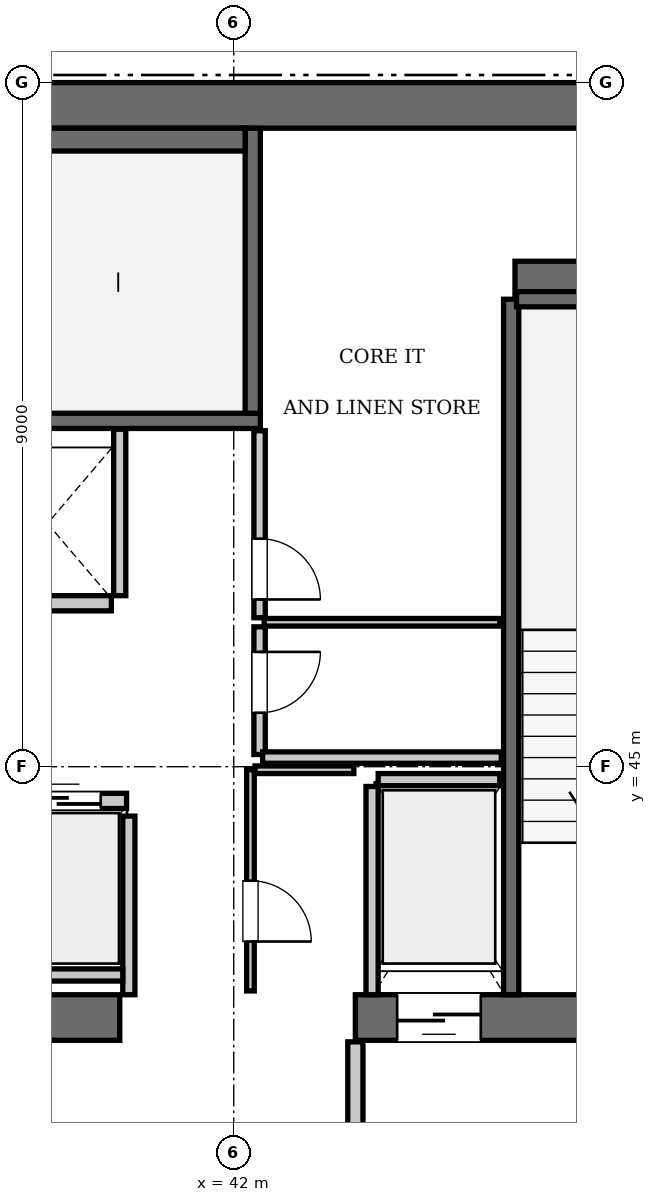
"""IFC4 building model, lengths in metres.
Left out: names, types, materials, properties, quantities, classifications, styles, units other than length and angle.
Written with IfcOpenShell. Run it as: python <this file> out.ifc"""

import sys

from ifc_helpers import new_model, si_unit, direction, frame, frame_2d, origin, place, context, subcontext, project, spatial, rectangle, extrude, element, fill, save


model = new_model("IFC4")
c1 = context("Model", 3, precision=1e-05, world=origin(), true_north=direction((0.0, 1.0)))
c2 = subcontext(c1, "Body", "Model", "MODEL_VIEW")
j1 = project(units=[si_unit("LENGTHUNIT", "METRE"), si_unit("PLANEANGLEUNIT", "RADIAN")], contexts=[c1])
p1 = place(None, origin())
s1 = spatial("IfcSite", under=j1, at=p1, CompositionType="ELEMENT")
p2 = place(p1, origin())
s2 = spatial("IfcBuilding", under=s1, at=p2, CompositionType="ELEMENT")
p3 = place(p2, frame((0.0, 0.0, 297.15)))
s3 = spatial("IfcBuildingStorey", under=s2, at=p3, CompositionType="ELEMENT", Elevation=297.15)
p4 = place(p3, frame((25.2, 53.7, 0.0), z_axis=(0.0, 0.0, 1.0), x_axis=(1.0, 0.0, 0.0)))
e1 = element("IfcWall", 1, at=p4, inside=s3, PredefinedType="SHEAR", context=c2, shape_type="SweptSolid", body=[
    extrude(rectangle(XDim=25.2, YDim=0.6, at=frame_2d((12.6, 0.0))), origin(), (0.0, 0.0, 1.0), 3.85),
])
p5 = place(p3, frame((35.1, 41.7, 0.0), z_axis=(0.0, 0.0, 1.0), x_axis=(1.0, 0.0, 0.0)))
e2 = element("IfcWall", 2, at=p5, inside=s3, PredefinedType="SHEAR", context=c2, shape_type="SweptSolid", body=[
    extrude(rectangle(XDim=5.4, YDim=0.6, at=frame_2d((2.7, 0.0))), origin(), (0.0, 0.0, 1.0), 3.85),
])
p6 = place(p3, frame((43.6, 41.7, 0.0), z_axis=(0.0, 0.0, 1.0), x_axis=(1.0, 0.0, 0.0)))
e3 = element("IfcWall", 3, at=p6, inside=s3, PredefinedType="SHEAR", context=c2, shape_type="SweptSolid", body=[
    extrude(rectangle(XDim=6.8, YDim=0.6, at=frame_2d((3.4, 0.0))), origin(), (0.0, 0.0, 1.0), 3.85),
])
p7 = place(p6, frame((3.9, 0.0, 0.0)))
e4 = element("IfcOpeningElement", 4, at=p7, cuts=e3, PredefinedType="OPENING", context=c2, shape_type="SweptSolid", body=[
    extrude(rectangle(XDim=1.15, YDim=2.15, at=frame_2d((0.575, 1.075))), frame((0.0, 0.31, 0.0), z_axis=(0.0, -1.0, 0.0), x_axis=(1.0, 0.0, 0.0)), (0.0, 0.0, 1.0), 0.62),
])
p8 = place(p6, frame((0.55, 0.0, 0.0)))
e5 = element("IfcOpeningElement", 5, at=p8, cuts=e3, PredefinedType="OPENING", context=c2, shape_type="SweptSolid", body=[
    extrude(rectangle(XDim=1.1, YDim=2.2, at=frame_2d((0.55, 1.1))), frame((0.0, 0.31, 0.0), z_axis=(0.0, -1.0, 0.0), x_axis=(1.0, 0.0, 0.0)), (0.0, 0.0, 1.0), 0.62),
])
p9 = place(p3, frame((45.7, 51.4, 0.0), z_axis=(0.0, 0.0, 1.0), x_axis=(1.0, 0.0, 0.0)))
e6 = element("IfcWall", 6, at=p9, inside=s3, PredefinedType="SHEAR", context=c2, shape_type="SweptSolid", body=[
    extrude(rectangle(XDim=4.1, YDim=0.5, at=frame_2d((2.05, 0.0))), origin(), (0.0, 0.0, 1.0), 3.85),
])
p10 = place(p3, frame((33.25, 49.55, 0.0), z_axis=(0.0, 0.0, 1.0), x_axis=(1.0, 0.0, 0.0)))
e7 = element("IfcWall", 7, at=p10, inside=s3, PredefinedType="SOLIDWALL", context=c2, shape_type="SweptSolid", body=[
    extrude(rectangle(XDim=9.1, YDim=0.2, at=frame_2d((4.55, 0.0))), origin(), (0.0, 0.0, 1.0), 3.61),
])
p11 = place(p3, frame((42.25, 49.65, 0.0), z_axis=(0.0, 0.0, 1.0), x_axis=(0.0, 1.0, 0.0)))
e8 = element("IfcWall", 8, at=p11, inside=s3, PredefinedType="SOLIDWALL", context=c2, shape_type="SweptSolid", body=[
    extrude(rectangle(XDim=3.75, YDim=0.2, at=frame_2d((1.875, 0.0))), origin(), (0.0, 0.0, 1.0), 3.61),
])
p12 = place(p3, frame((33.45, 53.25, 0.0), z_axis=(0.0, 0.0, 1.0), x_axis=(1.0, 0.0, 0.0)))
e9 = element("IfcWall", 9, at=p12, inside=s3, PredefinedType="SOLIDWALL", context=c2, shape_type="SweptSolid", body=[
    extrude(rectangle(XDim=8.7, YDim=0.3, at=frame_2d((4.35, 0.0))), origin(), (0.0, 0.0, 1.0), 3.61),
])
p13 = place(p3, frame((45.65, 42.0, 0.0), z_axis=(0.0, 0.0, 1.0), x_axis=(0.0, 1.0, 0.0)))
e10 = element("IfcWall", 10, at=p13, inside=s3, PredefinedType="SOLIDWALL", context=c2, shape_type="SweptSolid", body=[
    extrude(rectangle(XDim=9.15, YDim=0.2, at=frame_2d((4.575, 0.0))), origin(), (0.0, 0.0, 1.0), 3.61),
])
p14 = place(p3, frame((45.72, 51.15, 0.0), z_axis=(0.0, 0.0, 1.0), x_axis=(1.0, 0.0, 0.0)))
e11 = element("IfcWall", 11, at=p14, inside=s3, PredefinedType="SOLIDWALL", context=c2, shape_type="SweptSolid", body=[
    extrude(rectangle(XDim=3.5, YDim=0.2, at=frame_2d((1.75, 0.0))), origin(), (0.0, 0.0, 1.0), 3.61),
])
p15 = place(p3, frame((38.91, 44.55, 0.0), z_axis=(0.0, 0.0, 1.0), x_axis=(1.0, 0.0, 0.0)))
e12 = element("IfcWall", 12, at=p15, inside=s3, PredefinedType="SOLIDWALL", context=c2, shape_type="SweptSolid", body=[
    extrude(rectangle(XDim=1.68, YDim=0.2, at=frame_2d((0.84, 0.0))), origin(), (0.0, 0.0, 1.0), 3.61),
])
p16 = place(p15, frame((0.34, 0.0, 0.0)))
e13 = element("IfcOpeningElement", 13, at=p16, cuts=e12, PredefinedType="OPENING", context=c2, shape_type="SweptSolid", body=[
    extrude(rectangle(XDim=1.0, YDim=2.15, at=frame_2d((0.5, 1.075))), frame((0.0, 0.11, 0.0), z_axis=(0.0, -1.0, 0.0), x_axis=(1.0, 0.0, 0.0)), (0.0, 0.0, 1.0), 0.22),
])
p17 = place(p3, frame((38.71, 47.15, 0.0), z_axis=(0.0, 0.0, 1.0), x_axis=(1.0, 0.0, 0.0)))
e14 = element("IfcWall", 14, at=p17, inside=s3, PredefinedType="SOLIDWALL", context=c2, shape_type="SweptSolid", body=[
    extrude(rectangle(XDim=1.68, YDim=0.2, at=frame_2d((0.84, 0.0))), origin(), (0.0, 0.0, 1.0), 3.61),
])
p18 = place(p3, frame((43.9, 44.83, 0.0), z_axis=(0.0, 0.0, 1.0), x_axis=(1.0, 0.0, 0.0)))
e15 = element("IfcWall", 15, at=p18, inside=s3, PredefinedType="SOLIDWALL", context=c2, shape_type="SweptSolid", body=[
    extrude(rectangle(XDim=1.6, YDim=0.16, at=frame_2d((0.8, 0.0))), origin(), (0.0, 0.0, 1.0), 3.61),
])
p19 = place(p3, frame((43.82, 42.0, 0.0), z_axis=(0.0, 0.0, 1.0), x_axis=(0.0, 1.0, 0.0)))
e16 = element("IfcWall", 16, at=p19, inside=s3, PredefinedType="SOLIDWALL", context=c2, shape_type="SweptSolid", body=[
    extrude(rectangle(XDim=2.74, YDim=0.16, at=frame_2d((1.37, 0.0))), origin(), (0.0, 0.0, 1.0), 3.61),
])
p20 = place(p3, frame((40.62, 42.0, 0.0), z_axis=(0.0, 0.0, 1.0), x_axis=(0.0, 1.0, 0.0)))
e17 = element("IfcWall", 17, at=p20, inside=s3, PredefinedType="SOLIDWALL", context=c2, shape_type="SweptSolid", body=[
    extrude(rectangle(XDim=2.35, YDim=0.16, at=frame_2d((1.175, 0.0))), origin(), (0.0, 0.0, 1.0), 3.61),
])
p21 = place(p3, frame((35.52, 42.26, 0.0), z_axis=(0.0, 0.0, 1.0), x_axis=(1.0, 0.0, 0.0)))
e18 = element("IfcWall", 18, at=p21, inside=s3, PredefinedType="SOLIDWALL", context=c2, shape_type="SweptSolid", body=[
    extrude(rectangle(XDim=5.02, YDim=0.16, at=frame_2d((2.51, 0.0))), origin(), (0.0, 0.0, 1.0), 3.61),
])
p22 = place(p3, frame((40.5, 47.25, 0.0), z_axis=(0.0, 0.0, 1.0), x_axis=(0.0, 1.0, 0.0)))
e19 = element("IfcWall", 19, at=p22, inside=s3, PredefinedType="SOLIDWALL", context=c2, shape_type="SweptSolid", body=[
    extrude(rectangle(XDim=2.19, YDim=0.16, at=frame_2d((1.095, 0.0))), origin(), (0.0, 0.0, 1.0), 3.61),
])
p23 = place(p3, frame((43.6, 38.31, 0.0), z_axis=(0.0, 0.0, 1.0), x_axis=(0.0, 1.0, 0.0)))
e20 = element("IfcWall", 20, at=p23, inside=s3, PredefinedType="PARTITIONING", context=c2, shape_type="SweptSolid", body=[
    extrude(rectangle(XDim=3.07, YDim=0.2, at=frame_2d((1.535, 0.0))), origin(), (0.0, 0.0, 1.0), 3.61),
])
p24 = place(p3, frame((42.22, 42.05, 0.0), z_axis=(0.0, 0.0, 1.0), x_axis=(0.0, 1.0, 0.0)))
e21 = element("IfcWall", 21, at=p24, inside=s3, PredefinedType="PARTITIONING", context=c2, shape_type="SweptSolid", body=[
    extrude(rectangle(XDim=2.91, YDim=0.1, at=frame_2d((1.455, 0.0))), origin(), (0.0, 0.0, 1.0), 3.61),
])
p25 = place(p24, frame((0.65, 0.0, 0.0)))
e22 = element("IfcOpeningElement", 22, at=p25, cuts=e21, PredefinedType="OPENING", context=c2, shape_type="SweptSolid", body=[
    extrude(rectangle(XDim=0.8, YDim=2.05, at=frame_2d((0.4, 1.025))), frame((0.0, 0.06, 0.0), z_axis=(0.0, -1.0, 0.0), x_axis=(1.0, 0.0, 0.0)), (0.0, 0.0, 1.0), 0.12),
])
p26 = place(p3, frame((42.28, 44.96, 0.0), z_axis=(0.0, 0.0, 1.0), x_axis=(1.0, 0.0, 0.0)))
e23 = element("IfcWall", 23, at=p26, inside=s3, PredefinedType="PARTITIONING", context=c2, shape_type="SweptSolid", body=[
    extrude(rectangle(XDim=1.3, YDim=0.1, at=frame_2d((0.65, 0.0))), origin(), (0.0, 0.0, 1.0), 3.61),
])
p27 = place(p3, frame((42.34, 45.16, 0.0), z_axis=(0.0, 0.0, 1.0), x_axis=(0.0, 1.0, 0.0)))
e24 = element("IfcWall", 24, at=p27, inside=s3, PredefinedType="PARTITIONING", context=c2, shape_type="SweptSolid", body=[
    extrude(rectangle(XDim=1.68, YDim=0.15, at=frame_2d((0.84, 0.0))), origin(), (0.0, 0.0, 1.0), 3.61),
])
p28 = place(p27, frame((0.55, 0.0, 0.0)))
e25 = element("IfcOpeningElement", 25, at=p28, cuts=e24, PredefinedType="OPENING", context=c2, shape_type="SweptSolid", body=[
    extrude(rectangle(XDim=0.8, YDim=2.05, at=frame_2d((0.4, 1.025))), frame((0.0, 0.085, 0.0), z_axis=(0.0, -1.0, 0.0), x_axis=(1.0, 0.0, 0.0)), (0.0, 0.0, 1.0), 0.17),
])
p29 = place(p3, frame((42.34, 46.96, 0.0), z_axis=(0.0, 0.0, 1.0), x_axis=(0.0, 1.0, 0.0)))
e26 = element("IfcWall", 26, at=p29, inside=s3, PredefinedType="PARTITIONING", context=c2, shape_type="SweptSolid", body=[
    extrude(rectangle(XDim=2.46, YDim=0.15, at=frame_2d((1.23, 0.0))), origin(), (0.0, 0.0, 1.0), 3.61),
])
p30 = place(p29, frame((0.24, 0.0, 0.0)))
e27 = element("IfcOpeningElement", 27, at=p30, cuts=e26, PredefinedType="OPENING", context=c2, shape_type="SweptSolid", body=[
    extrude(rectangle(XDim=0.8, YDim=2.05, at=frame_2d((0.4, 1.025))), frame((0.0, 0.085, 0.0), z_axis=(0.0, -1.0, 0.0), x_axis=(1.0, 0.0, 0.0)), (0.0, 0.0, 1.0), 0.17),
])
p31 = place(p3, frame((42.4, 46.9, 0.0), z_axis=(0.0, 0.0, 1.0), x_axis=(1.0, 0.0, 0.0)))
e28 = element("IfcWall", 28, at=p31, inside=s3, PredefinedType="PARTITIONING", context=c2, shape_type="SweptSolid", body=[
    extrude(rectangle(XDim=3.1, YDim=0.1, at=frame_2d((1.55, 0.0))), origin(), (0.0, 0.0, 1.0), 3.61),
])
p32 = place(p3, frame((42.38, 45.12, 0.0), z_axis=(0.0, 0.0, 1.0), x_axis=(1.0, 0.0, 0.0)))
e29 = element("IfcWall", 29, at=p32, inside=s3, PredefinedType="PARTITIONING", context=c2, shape_type="SweptSolid", body=[
    extrude(rectangle(XDim=3.14, YDim=0.15, at=frame_2d((1.57, 0.0))), origin(), (0.0, 0.0, 1.0), 3.61),
])
p33 = place(p16, origin())
e30 = element("IfcDoor", 30, at=p33, inside=s3, OperationType="SLIDING_TO_LEFT", PredefinedType="DOOR", context=c2, shape_type="SweptSolid", body=[
    extrude(rectangle(XDim=1.0, YDim=2.15, at=frame_2d((0.5, 1.075))), frame((0.0, 0.025, 0.0), z_axis=(0.0, -1.0, 0.0), x_axis=(1.0, 0.0, 0.0)), (0.0, 0.0, 1.0), 0.05),
])
fill(e13, e30)
p34 = place(p8, frame((1.1, 0.0, 0.0), z_axis=(0.0, 0.0, 1.0), x_axis=(-1.0, 0.0, 0.0)))
e31 = element("IfcDoor", 31, at=p34, inside=s3, OperationType="SLIDING_TO_LEFT", PredefinedType="DOOR", context=c2, shape_type="SweptSolid", body=[
    extrude(rectangle(XDim=1.1, YDim=2.2, at=frame_2d((0.55, 1.1))), frame((0.0, 0.025, 0.0), z_axis=(0.0, -1.0, 0.0), x_axis=(1.0, 0.0, 0.0)), (0.0, 0.0, 1.0), 0.05),
])
fill(e5, e31)
p35 = place(p25, frame((0.8, 0.0, 0.0), z_axis=(0.0, 0.0, 1.0), x_axis=(-1.0, 0.0, 0.0)))
e32 = element("IfcDoor", 32, at=p35, inside=s3, OperationType="SINGLE_SWING_RIGHT", PredefinedType="DOOR", context=c2, shape_type="SweptSolid", body=[
    extrude(rectangle(XDim=0.8, YDim=2.05, at=frame_2d((0.4, 1.025))), frame((0.0, 0.025, 0.0), z_axis=(0.0, -1.0, 0.0), x_axis=(1.0, 0.0, 0.0)), (0.0, 0.0, 1.0), 0.05),
])
fill(e22, e32)
p36 = place(p28, frame((0.8, 0.0, 0.0), z_axis=(0.0, 0.0, 1.0), x_axis=(-1.0, 0.0, 0.0)))
e33 = element("IfcDoor", 33, at=p36, inside=s3, OperationType="SINGLE_SWING_LEFT", PredefinedType="DOOR", context=c2, shape_type="SweptSolid", body=[
    extrude(rectangle(XDim=0.8, YDim=2.05, at=frame_2d((0.4, 1.025))), frame((0.0, 0.025, 0.0), z_axis=(0.0, -1.0, 0.0), x_axis=(1.0, 0.0, 0.0)), (0.0, 0.0, 1.0), 0.05),
])
fill(e25, e33)
p37 = place(p30, frame((0.8, 0.0, 0.0), z_axis=(0.0, 0.0, 1.0), x_axis=(-1.0, 0.0, 0.0)))
e34 = element("IfcDoor", 34, at=p37, inside=s3, OperationType="SINGLE_SWING_RIGHT", PredefinedType="DOOR", context=c2, shape_type="SweptSolid", body=[
    extrude(rectangle(XDim=0.8, YDim=2.05, at=frame_2d((0.4, 1.025))), frame((0.0, 0.025, 0.0), z_axis=(0.0, -1.0, 0.0), x_axis=(1.0, 0.0, 0.0)), (0.0, 0.0, 1.0), 0.05),
])
fill(e27, e34)
save(model, sys.argv[1])
